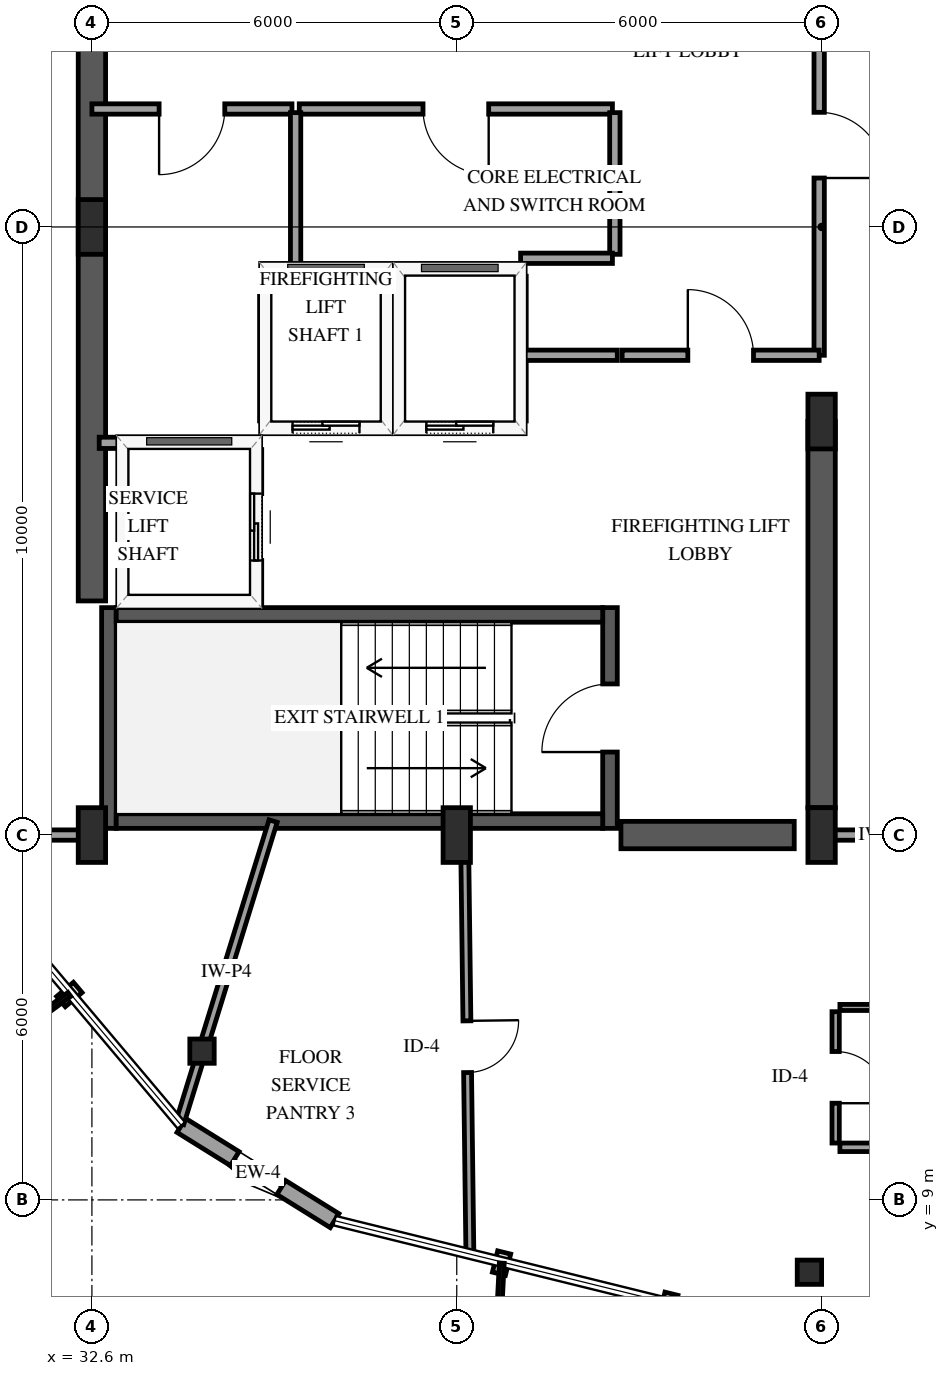
"""IFC4 building model, lengths in metres.
Left out: names, types, materials, properties, quantities, classifications, styles, units other than length and angle.
Written with IfcOpenShell. Run it as: python <this file> out.ifc"""

import sys

from ifc_helpers import new_model, si_unit, direction, frame, frame_2d, origin, origin_2d, place, context, subcontext, project, spatial, rectangle, i_section, extrude, element, fill, save


model = new_model("IFC4")
c1 = context("Model", 3, precision=1e-05, world=origin(), true_north=direction((0.0, 1.0)))
c2 = subcontext(c1, "Body", "Model", "MODEL_VIEW")
j1 = project(units=[si_unit("LENGTHUNIT", "METRE"), si_unit("PLANEANGLEUNIT", "RADIAN")], contexts=[c1])
p1 = place(None, origin())
s1 = spatial("IfcSite", under=j1, at=p1, CompositionType="ELEMENT")
p2 = place(p1, origin())
s2 = spatial("IfcBuilding", under=s1, at=p2, CompositionType="ELEMENT")
p3 = place(p2, frame((0.0, 0.0, 246.25)))
s3 = spatial("IfcBuildingStorey", under=s2, at=p3, CompositionType="ELEMENT", Elevation=246.25)
p4 = place(p3, frame((32.88, 15.11, 0.0), z_axis=(0.0, 0.0, 1.0), x_axis=(0.0, 1.0, 0.0)))
e1 = element("IfcWall", 1, at=p4, inside=s3, PredefinedType="SHEAR", context=c2, shape_type="SweptSolid", body=[
    extrude(rectangle(XDim=3.63, YDim=0.24, at=frame_2d((1.815, 0.0))), origin(), (0.0, 0.0, 1.0), 3.75),
])
p5 = place(p3, frame((41.12, 15.11, 0.0), z_axis=(0.0, 0.0, 1.0), x_axis=(0.0, 1.0, 0.0)))
e2 = element("IfcWall", 2, at=p5, inside=s3, PredefinedType="SHEAR", context=c2, shape_type="SweptSolid", body=[
    extrude(rectangle(XDim=3.63, YDim=0.24, at=frame_2d((1.815, 0.0))), origin(), (0.0, 0.0, 1.0), 3.75),
])
p6 = place(p5, frame((1.255, 0.0, 0.0)))
e3 = element("IfcOpeningElement", 3, at=p6, cuts=e2, PredefinedType="OPENING", context=c2, shape_type="SweptSolid", body=[
    extrude(rectangle(XDim=1.12, YDim=2.15, at=frame_2d((0.56, 1.075))), frame((0.0, 0.13, 0.0), z_axis=(0.0, -1.0, 0.0), x_axis=(1.0, 0.0, 0.0)), (0.0, 0.0, 1.0), 0.26),
])
for number, where, z_axis, x_axis in (
    (4, (33.0, 15.23, 0.0), (0.0, 0.0, 1.0), (1.0, 0.0, 0.0)),
    (5, (33.0, 18.62, 0.0), (0.0, 0.0, 1.0), (1.0, 0.0, 0.0)),
):
    element("IfcWall", number, at=place(p3, frame(where, z_axis=z_axis, x_axis=x_axis)), inside=s3, PredefinedType="SHEAR", context=c2, shape_type="SweptSolid", body=[
        extrude(rectangle(XDim=8.0, YDim=0.24, at=frame_2d((4.0, 0.0))), origin(), (0.0, 0.0, 1.0), 3.75),
    ])
p7 = place(p3, frame((32.6, 18.85, 0.0), z_axis=(0.0, 0.0, 1.0), x_axis=(0.0, 1.0, 0.0)))
e6 = element("IfcWall", 6, at=p7, inside=s3, PredefinedType="SHEAR", context=c2, shape_type="SweptSolid", body=[
    extrude(rectangle(XDim=12.3, YDim=0.45, at=frame_2d((6.15, 0.0))), origin(), (0.0, 0.0, 1.0), 3.75),
])
p8 = place(p3, frame((41.3, 15.0, 0.0), z_axis=(0.0, 0.0, 1.0), x_axis=(1.0, 0.0, 0.0)))
e7 = element("IfcWall", 7, at=p8, inside=s3, PredefinedType="SHEAR", context=c2, shape_type="SweptSolid", body=[
    extrude(rectangle(XDim=2.85, YDim=0.45, at=frame_2d((1.425, 0.0))), origin(), (0.0, 0.0, 1.0), 3.75),
])
p9 = place(p3, frame((44.6, 15.45, 0.0), z_axis=(0.0, 0.0, 1.0), x_axis=(0.0, 1.0, 0.0)))
e8 = element("IfcWall", 8, at=p9, inside=s3, PredefinedType="SHEAR", context=c2, shape_type="SweptSolid", body=[
    extrude(rectangle(XDim=6.35, YDim=0.45, at=frame_2d((3.175, 0.0))), origin(), (0.0, 0.0, 1.0), 3.75),
])
for number, where, z_axis, x_axis in (
    (9, (32.6, 15.0, 0.0), (0.0, 0.0, 1.0), (1.0, 0.0, 0.0)),
    (10, (32.6, 25.0, 0.0), (0.0, 0.0, 1.0), (1.0, 0.0, 0.0)),
    (11, (38.6, 15.0, 0.0), (0.0, 0.0, 1.0), (1.0, 0.0, 0.0)),
    (12, (44.6, 15.0, 0.0), (0.0, 0.0, 1.0), (1.0, 0.0, 0.0)),
    (13, (44.6, 21.8, 0.0), (0.0, 0.0, 1.0), (1.0, 0.0, 0.0)),
):
    element("IfcColumn", number, at=place(p3, frame(where, z_axis=z_axis, x_axis=x_axis)), inside=s3, PredefinedType="PILASTER", context=c2, shape_type="SweptSolid", body=[
        extrude(rectangle(XDim=0.45, YDim=0.9, at=origin_2d()), origin(), (0.0, 0.0, 1.0), 3.75),
    ])
for number, where, z_axis, x_axis in (
    (14, (34.411, 11.446, 0.0), (0.0, 0.0, 1.0), (1.0, 0.0, 0.0)),
    (15, (44.4, 7.811, 0.0), (0.0, 0.0, 1.0), (1.0, 0.0, 0.0)),
):
    element("IfcColumn", number, at=place(p3, frame(where, z_axis=z_axis, x_axis=x_axis)), inside=s3, PredefinedType="COLUMN", context=c2, shape_type="SweptSolid", body=[
        extrude(i_section(OverallWidth=0.401, OverallDepth=0.399, WebThickness=0.025, FlangeThickness=0.04, FilletRadius=0.038, at=origin_2d()), origin(), (0.0, 0.0, 1.0), 3.75),
    ])
p10 = place(p3, frame((34.071, 10.225, 0.0), z_axis=(0.0, 0.0, 1.0), x_axis=(0.849350139028, -0.527829841268, 0.0)))
e16 = element("IfcWall", 16, at=p10, inside=s3, PredefinedType="SOLIDWALL", context=c2, shape_type="SweptSolid", body=[
    extrude(rectangle(XDim=2.967, YDim=0.27, at=frame_2d((1.483, 0.0))), origin(), (0.0, 0.0, 1.0), 2.829),
])
p11 = place(p10, frame((1.033, 0.0, 0.75)))
e17 = element("IfcOpeningElement", 17, at=p11, cuts=e16, PredefinedType="OPENING", context=c2, shape_type="SweptSolid", body=[
    extrude(rectangle(XDim=0.9, YDim=1.5, at=frame_2d((0.45, 0.75))), frame((0.0, 0.145, 0.0), z_axis=(0.0, -1.0, 0.0), x_axis=(1.0, 0.0, 0.0)), (0.0, 0.0, 1.0), 0.29),
])
p12 = place(p3, frame((35.45, 21.7, 0.0), z_axis=(0.0, 0.0, 1.0), x_axis=(1.0, 0.0, 0.0)))
e18 = element("IfcWall", 18, at=p12, inside=s3, PredefinedType="SOLIDWALL", context=c2, shape_type="SweptSolid", body=[
    extrude(rectangle(XDim=2.0, YDim=0.185, at=frame_2d((1.0, 0.0))), origin(), (0.0, 0.0, 1.0), 2.824),
])
p13 = place(p12, frame((0.45, 0.0, 0.0)))
e19 = element("IfcOpeningElement", 19, at=p13, cuts=e18, PredefinedType="OPENING", context=c2, shape_type="SweptSolid", body=[
    extrude(rectangle(XDim=1.1, YDim=2.15, at=frame_2d((0.55, 1.075))), frame((0.0, 0.103, 0.0), z_axis=(0.0, -1.0, 0.0), x_axis=(1.0, 0.0, 0.0)), (0.0, 0.0, 1.0), 0.205),
])
p14 = place(p3, frame((35.45, 24.3, 0.0), z_axis=(0.0, 0.0, 1.0), x_axis=(1.0, 0.0, 0.0)))
e20 = element("IfcWall", 20, at=p14, inside=s3, PredefinedType="SOLIDWALL", context=c2, shape_type="SweptSolid", body=[
    extrude(rectangle(XDim=2.0, YDim=0.185, at=frame_2d((1.0, 0.0))), origin(), (0.0, 0.0, 1.0), 3.45),
])
for number, where, z_axis, x_axis in (
    (21, (35.45, 21.81, 0.0), (0.0, 0.0, 1.0), (0.0, 1.0, 0.0)),
    (22, (37.45, 21.81, 0.0), (0.0, 0.0, 1.0), (0.0, 1.0, 0.0)),
):
    element("IfcWall", number, at=place(p3, frame(where, z_axis=z_axis, x_axis=x_axis)), inside=s3, PredefinedType="SOLIDWALL", context=c2, shape_type="SweptSolid", body=[
        extrude(rectangle(XDim=2.38, YDim=0.185, at=frame_2d((1.19, 0.0))), origin(), (0.0, 0.0, 1.0), 3.45),
    ])
p15 = place(p3, frame((37.65, 21.7, 0.0), z_axis=(0.0, 0.0, 1.0), x_axis=(1.0, 0.0, 0.0)))
e23 = element("IfcWall", 23, at=p15, inside=s3, PredefinedType="SOLIDWALL", context=c2, shape_type="SweptSolid", body=[
    extrude(rectangle(XDim=2.0, YDim=0.185, at=frame_2d((1.0, 0.0))), origin(), (0.0, 0.0, 1.0), 2.824),
])
p16 = place(p15, frame((0.45, 0.0, 0.0)))
e24 = element("IfcOpeningElement", 24, at=p16, cuts=e23, PredefinedType="OPENING", context=c2, shape_type="SweptSolid", body=[
    extrude(rectangle(XDim=1.1, YDim=2.15, at=frame_2d((0.55, 1.075))), frame((0.0, 0.103, 0.0), z_axis=(0.0, -1.0, 0.0), x_axis=(1.0, 0.0, 0.0)), (0.0, 0.0, 1.0), 0.205),
])
p17 = place(p3, frame((37.65, 24.3, 0.0), z_axis=(0.0, 0.0, 1.0), x_axis=(1.0, 0.0, 0.0)))
e25 = element("IfcWall", 25, at=p17, inside=s3, PredefinedType="SOLIDWALL", context=c2, shape_type="SweptSolid", body=[
    extrude(rectangle(XDim=2.0, YDim=0.185, at=frame_2d((1.0, 0.0))), origin(), (0.0, 0.0, 1.0), 3.45),
])
p18 = place(p3, frame((39.65, 21.81, 0.0), z_axis=(0.0, 0.0, 1.0), x_axis=(0.0, 1.0, 0.0)))
e26 = element("IfcWall", 26, at=p18, inside=s3, PredefinedType="SOLIDWALL", context=c2, shape_type="SweptSolid", body=[
    extrude(rectangle(XDim=2.38, YDim=0.185, at=frame_2d((1.19, 0.0))), origin(), (0.0, 0.0, 1.0), 3.45),
])
p19 = place(p3, frame((32.72, 21.45, 0.0), z_axis=(0.0, 0.0, 1.0), x_axis=(1.0, 0.0, 0.0)))
e27 = element("IfcWall", 27, at=p19, inside=s3, PredefinedType="SOLIDWALL", context=c2, shape_type="SweptSolid", body=[
    extrude(rectangle(XDim=2.58, YDim=0.185, at=frame_2d((1.29, 0.0))), origin(), (0.0, 0.0, 1.0), 3.45),
])
p20 = place(p3, frame((35.3, 18.79, 0.0), z_axis=(0.0, 0.0, 1.0), x_axis=(0.0, 1.0, 0.0)))
e28 = element("IfcWall", 28, at=p20, inside=s3, PredefinedType="SOLIDWALL", context=c2, shape_type="SweptSolid", body=[
    extrude(rectangle(XDim=2.55, YDim=0.185, at=frame_2d((1.275, 0.0))), origin(), (0.0, 0.0, 1.0), 3.45),
])
p21 = place(p20, frame((0.725, 0.0, 0.0)))
e29 = element("IfcOpeningElement", 29, at=p21, cuts=e28, PredefinedType="OPENING", context=c2, shape_type="SweptSolid", body=[
    extrude(rectangle(XDim=1.1, YDim=2.15, at=frame_2d((0.55, 1.075))), frame((0.0, 0.103, 0.0), z_axis=(0.0, -1.0, 0.0), x_axis=(1.0, 0.0, 0.0)), (0.0, 0.0, 1.0), 0.205),
])
p22 = place(p3, frame((44.56, 29.8, 0.0), z_axis=(0.0, 0.0, 1.0), x_axis=(0.0, -1.0, 0.0)))
e30 = element("IfcWall", 30, at=p22, inside=s3, PredefinedType="PARTITIONING", context=c2, shape_type="SweptSolid", body=[
    extrude(rectangle(XDim=6.91, YDim=0.17, at=frame_2d((3.455, 0.0))), origin(), (0.0, 0.0, 1.0), 2.49),
])
p23 = place(p22, frame((2.915, 0.0, 0.0)))
e31 = element("IfcOpeningElement", 31, at=p23, cuts=e30, PredefinedType="OPENING", context=c2, shape_type="SweptSolid", body=[
    extrude(rectangle(XDim=1.08, YDim=2.15, at=frame_2d((0.54, 1.075))), frame((0.0, 0.095, 0.0), z_axis=(0.0, -1.0, 0.0), x_axis=(1.0, 0.0, 0.0)), (0.0, 0.0, 1.0), 0.19),
])
p24 = place(p3, frame((38.729, 14.929, 0.0), z_axis=(0.0, 0.0, 1.0), x_axis=(0.01274511582, -0.999918777713, 0.0)))
e32 = element("IfcWall", 32, at=p24, inside=s3, PredefinedType="PARTITIONING", context=c2, shape_type="SweptSolid", body=[
    extrude(rectangle(XDim=6.819, YDim=0.13, at=frame_2d((3.41, 0.0))), origin(), (0.0, 0.0, 1.0), 3.45),
])
p25 = place(p24, frame((2.985, 0.0, 0.0)))
e33 = element("IfcOpeningElement", 33, at=p25, cuts=e32, PredefinedType="OPENING", context=c2, shape_type="SweptSolid", body=[
    extrude(rectangle(XDim=0.85, YDim=2.1, at=frame_2d((0.425, 1.05))), frame((0.0, 0.075, 0.0), z_axis=(0.0, -1.0, 0.0), x_axis=(1.0, 0.0, 0.0)), (0.0, 0.0, 1.0), 0.15),
])
p26 = place(p3, frame((35.58, 15.23, 0.0), z_axis=(0.0, 0.0, 1.0), x_axis=(-0.2953646639, -0.955384590267, 0.0)))
e34 = element("IfcWall", 34, at=p26, inside=s3, PredefinedType="PARTITIONING", context=c2, shape_type="SweptSolid", body=[
    extrude(rectangle(XDim=5.204, YDim=0.14, at=frame_2d((2.602, 0.0))), origin(), (0.0, 0.0, 1.0), 2.745),
])
p27 = place(p3, frame((41.16, 26.94, 0.0), z_axis=(0.0, 0.0, 1.0), x_axis=(-1.0, 0.0, 0.0)))
e35 = element("IfcWall", 35, at=p27, inside=s3, PredefinedType="PARTITIONING", context=c2, shape_type="SweptSolid", body=[
    extrude(rectangle(XDim=5.15, YDim=0.17, at=frame_2d((2.575, 0.0))), origin(), (0.0, 0.0, 1.0), 3.45),
])
p28 = place(p27, frame((2.035, 0.0, 0.0)))
e36 = element("IfcOpeningElement", 36, at=p28, cuts=e35, PredefinedType="OPENING", context=c2, shape_type="SweptSolid", body=[
    extrude(rectangle(XDim=1.08, YDim=2.15, at=frame_2d((0.54, 1.075))), frame((0.0, 0.095, 0.0), z_axis=(0.0, -1.0, 0.0), x_axis=(1.0, 0.0, 0.0)), (0.0, 0.0, 1.0), 0.19),
])
p29 = place(p3, frame((35.89, 26.94, 0.0), z_axis=(0.0, 0.0, 1.0), x_axis=(-1.0, 0.0, 0.0)))
e37 = element("IfcWall", 37, at=p29, inside=s3, PredefinedType="PARTITIONING", context=c2, shape_type="SweptSolid", body=[
    extrude(rectangle(XDim=3.29, YDim=0.17, at=frame_2d((1.645, 0.0))), origin(), (0.0, 0.0, 1.0), 3.45),
])
p30 = place(p29, frame((1.105, 0.0, 0.0)))
e38 = element("IfcOpeningElement", 38, at=p30, cuts=e37, PredefinedType="OPENING", context=c2, shape_type="SweptSolid", body=[
    extrude(rectangle(XDim=1.08, YDim=2.15, at=frame_2d((0.54, 1.075))), frame((0.0, 0.095, 0.0), z_axis=(0.0, -1.0, 0.0), x_axis=(1.0, 0.0, 0.0)), (0.0, 0.0, 1.0), 0.19),
])
p31 = place(p3, frame((41.32, 22.89, 0.0), z_axis=(0.0, 0.0, 1.0), x_axis=(1.0, 0.0, 0.0)))
e39 = element("IfcWall", 39, at=p31, inside=s3, PredefinedType="PARTITIONING", context=c2, shape_type="SweptSolid", body=[
    extrude(rectangle(XDim=3.24, YDim=0.17, at=frame_2d((1.62, 0.0))), origin(), (0.0, 0.0, 1.0), 3.45),
])
p32 = place(p31, frame((1.08, 0.0, 0.0)))
e40 = element("IfcOpeningElement", 40, at=p32, cuts=e39, PredefinedType="OPENING", context=c2, shape_type="SweptSolid", body=[
    extrude(rectangle(XDim=1.08, YDim=2.15, at=frame_2d((0.54, 1.075))), frame((0.0, 0.095, 0.0), z_axis=(0.0, -1.0, 0.0), x_axis=(1.0, 0.0, 0.0)), (0.0, 0.0, 1.0), 0.19),
])
p33 = place(p3, frame((35.95, 26.88, 0.0), z_axis=(0.0, 0.0, 1.0), x_axis=(0.0, -1.0, 0.0)))
e41 = element("IfcWall", 41, at=p33, inside=s3, PredefinedType="PARTITIONING", context=c2, shape_type="SweptSolid", body=[
    extrude(rectangle(XDim=2.58, YDim=0.17, at=frame_2d((1.29, 0.0))), origin(), (0.0, 0.0, 1.0), 3.45),
])
p34 = place(p3, frame((32.53, 15.0, 0.0), z_axis=(0.0, 0.0, 1.0), x_axis=(-1.0, 0.0, 0.0)))
e42 = element("IfcWall", 42, at=p34, inside=s3, PredefinedType="PARTITIONING", context=c2, shape_type="SweptSolid", body=[
    extrude(rectangle(XDim=2.486, YDim=0.17, at=frame_2d((1.243, 0.0))), origin(), (0.0, 0.0, 1.0), 3.45),
])
p35 = place(p34, frame((0.768, 0.0, 0.0)))
e43 = element("IfcOpeningElement", 43, at=p35, cuts=e42, PredefinedType="OPENING", context=c2, shape_type="SweptSolid", body=[
    extrude(rectangle(XDim=0.98, YDim=2.15, at=frame_2d((0.49, 1.075))), frame((0.0, 0.095, 0.0), z_axis=(0.0, -1.0, 0.0), x_axis=(1.0, 0.0, 0.0)), (0.0, 0.0, 1.0), 0.19),
])
p36 = place(p3, frame((41.2, 24.55, 0.0), z_axis=(0.0, 0.0, 1.0), x_axis=(0.0, 1.0, 0.0)))
e44 = element("IfcWall", 44, at=p36, inside=s3, PredefinedType="PARTITIONING", context=c2, shape_type="SweptSolid", body=[
    extrude(rectangle(XDim=2.33, YDim=0.17, at=frame_2d((1.165, 0.0))), origin(), (0.0, 0.0, 1.0), 3.45),
])
p37 = place(p3, frame((44.831, 12.095, 0.0), z_axis=(0.0, 0.0, 1.0), x_axis=(0.0, -1.0, 0.0)))
e45 = element("IfcWall", 45, at=p37, inside=s3, PredefinedType="PARTITIONING", context=c2, shape_type="SweptSolid", body=[
    extrude(rectangle(XDim=2.16, YDim=0.12, at=frame_2d((1.08, 0.0))), origin(), (0.0, 0.0, 1.0), 2.828),
])
p38 = place(p37, frame((0.655, 0.0, 0.0)))
e46 = element("IfcOpeningElement", 46, at=p38, cuts=e45, PredefinedType="OPENING", context=c2, shape_type="SweptSolid", body=[
    extrude(rectangle(XDim=0.85, YDim=2.1, at=frame_2d((0.425, 1.05))), frame((0.0, 0.07, 0.0), z_axis=(0.0, -1.0, 0.0), x_axis=(1.0, 0.0, 0.0)), (0.0, 0.0, 1.0), 0.14),
])
p39 = place(p3, frame((47.061, 12.165, 0.0), z_axis=(0.0, 0.0, 1.0), x_axis=(-1.0, 0.0, 0.0)))
e47 = element("IfcWall", 47, at=p39, inside=s3, PredefinedType="PARTITIONING", context=c2, shape_type="SweptSolid", body=[
    extrude(rectangle(XDim=2.16, YDim=0.1, at=frame_2d((1.08, 0.0))), origin(), (0.0, 0.0, 1.0), 3.45),
])
p40 = place(p3, frame((44.901, 9.865, 0.0), z_axis=(0.0, 0.0, 1.0), x_axis=(1.0, 0.0, 0.0)))
e48 = element("IfcWall", 48, at=p40, inside=s3, PredefinedType="PARTITIONING", context=c2, shape_type="SweptSolid", body=[
    extrude(rectangle(XDim=2.16, YDim=0.14, at=frame_2d((1.08, 0.0))), origin(), (0.0, 0.0, 1.0), 3.45),
])
p41 = place(p3, frame((39.72, 22.89, 0.0), z_axis=(0.0, 0.0, 1.0), x_axis=(1.0, 0.0, 0.0)))
e49 = element("IfcWall", 49, at=p41, inside=s3, PredefinedType="PARTITIONING", context=c2, shape_type="SweptSolid", body=[
    extrude(rectangle(XDim=1.52, YDim=0.17, at=frame_2d((0.76, 0.0))), origin(), (0.0, 0.0, 1.0), 3.45),
])
p42 = place(p3, frame((39.65, 24.485, 0.0), z_axis=(0.0, 0.0, 1.0), x_axis=(1.0, 0.0, 0.0)))
e50 = element("IfcWall", 50, at=p42, inside=s3, PredefinedType="PARTITIONING", context=c2, shape_type="SweptSolid", body=[
    extrude(rectangle(XDim=1.51, YDim=0.17, at=frame_2d((0.755, 0.0))), origin(), (0.0, 0.0, 1.0), 3.45),
])
p43 = place(p3, frame((45.439, 15.0, 0.0), z_axis=(0.0, 0.0, 1.0), x_axis=(-1.0, 0.0, 0.0)))
e51 = element("IfcWall", 51, at=p43, inside=s3, PredefinedType="PARTITIONING", context=c2, shape_type="SweptSolid", body=[
    extrude(rectangle(XDim=0.769, YDim=0.17, at=frame_2d((0.385, 0.0))), origin(), (0.0, 0.0, 1.0), 3.45),
])
p44 = place(p11, origin())
e52 = element("IfcWindow", 52, at=p44, inside=s3, PartitioningType="SINGLE_PANEL", PredefinedType="WINDOW", context=c2, shape_type="SweptSolid", body=[
    extrude(rectangle(XDim=0.9, YDim=1.5, at=frame_2d((0.45, 0.75))), frame((0.0, 0.03, 0.0), z_axis=(0.0, -1.0, 0.0), x_axis=(1.0, 0.0, 0.0)), (0.0, 0.0, 1.0), 0.06),
])
fill(e17, e52)
p45 = place(p13, origin())
e53 = element("IfcDoor", 53, at=p45, inside=s3, OperationType="SLIDING_TO_LEFT", PredefinedType="DOOR", context=c2, shape_type="SweptSolid", body=[
    extrude(rectangle(XDim=1.1, YDim=2.15, at=frame_2d((0.55, 1.075))), frame((0.0, 0.025, 0.0), z_axis=(0.0, -1.0, 0.0), x_axis=(1.0, 0.0, 0.0)), (0.0, 0.0, 1.0), 0.05),
])
fill(e19, e53)
p46 = place(p16, origin())
e54 = element("IfcDoor", 54, at=p46, inside=s3, OperationType="SLIDING_TO_LEFT", PredefinedType="DOOR", context=c2, shape_type="SweptSolid", body=[
    extrude(rectangle(XDim=1.1, YDim=2.15, at=frame_2d((0.55, 1.075))), frame((0.0, 0.025, 0.0), z_axis=(0.0, -1.0, 0.0), x_axis=(1.0, 0.0, 0.0)), (0.0, 0.0, 1.0), 0.05),
])
fill(e24, e54)
p47 = place(p21, origin())
e55 = element("IfcDoor", 55, at=p47, inside=s3, OperationType="SLIDING_TO_LEFT", PredefinedType="DOOR", context=c2, shape_type="SweptSolid", body=[
    extrude(rectangle(XDim=1.1, YDim=2.15, at=frame_2d((0.55, 1.075))), frame((0.0, 0.025, 0.0), z_axis=(0.0, -1.0, 0.0), x_axis=(1.0, 0.0, 0.0)), (0.0, 0.0, 1.0), 0.05),
])
fill(e29, e55)
p48 = place(p6, origin())
e56 = element("IfcDoor", 56, at=p48, inside=s3, OperationType="SINGLE_SWING_LEFT", PredefinedType="DOOR", context=c2, shape_type="SweptSolid", body=[
    extrude(rectangle(XDim=1.12, YDim=2.15, at=frame_2d((0.56, 1.075))), frame((0.0, 0.025, 0.0), z_axis=(0.0, -1.0, 0.0), x_axis=(1.0, 0.0, 0.0)), (0.0, 0.0, 1.0), 0.05),
])
fill(e3, e56)
p49 = place(p23, origin())
e57 = element("IfcDoor", 57, at=p49, inside=s3, OperationType="SINGLE_SWING_RIGHT", PredefinedType="DOOR", context=c2, shape_type="SweptSolid", body=[
    extrude(rectangle(XDim=1.08, YDim=2.15, at=frame_2d((0.54, 1.075))), frame((0.0, 0.025, 0.0), z_axis=(0.0, -1.0, 0.0), x_axis=(1.0, 0.0, 0.0)), (0.0, 0.0, 1.0), 0.05),
])
fill(e31, e57)
p50 = place(p25, origin())
e58 = element("IfcDoor", 58, at=p50, inside=s3, OperationType="SINGLE_SWING_LEFT", PredefinedType="DOOR", context=c2, shape_type="SweptSolid", body=[
    extrude(rectangle(XDim=0.85, YDim=2.1, at=frame_2d((0.425, 1.05))), frame((0.0, 0.025, 0.0), z_axis=(0.0, -1.0, 0.0), x_axis=(1.0, 0.0, 0.0)), (0.0, 0.0, 1.0), 0.05),
])
fill(e33, e58)
p51 = place(p28, origin())
e59 = element("IfcDoor", 59, at=p51, inside=s3, OperationType="SINGLE_SWING_LEFT", PredefinedType="DOOR", context=c2, shape_type="SweptSolid", body=[
    extrude(rectangle(XDim=1.08, YDim=2.15, at=frame_2d((0.54, 1.075))), frame((0.0, 0.025, 0.0), z_axis=(0.0, -1.0, 0.0), x_axis=(1.0, 0.0, 0.0)), (0.0, 0.0, 1.0), 0.05),
])
fill(e36, e59)
p52 = place(p30, origin())
e60 = element("IfcDoor", 60, at=p52, inside=s3, OperationType="SINGLE_SWING_RIGHT", PredefinedType="DOOR", context=c2, shape_type="SweptSolid", body=[
    extrude(rectangle(XDim=1.08, YDim=2.15, at=frame_2d((0.54, 1.075))), frame((0.0, 0.025, 0.0), z_axis=(0.0, -1.0, 0.0), x_axis=(1.0, 0.0, 0.0)), (0.0, 0.0, 1.0), 0.05),
])
fill(e38, e60)
p53 = place(p32, origin())
e61 = element("IfcDoor", 61, at=p53, inside=s3, OperationType="SINGLE_SWING_LEFT", PredefinedType="DOOR", context=c2, shape_type="SweptSolid", body=[
    extrude(rectangle(XDim=1.08, YDim=2.15, at=frame_2d((0.54, 1.075))), frame((0.0, 0.025, 0.0), z_axis=(0.0, -1.0, 0.0), x_axis=(1.0, 0.0, 0.0)), (0.0, 0.0, 1.0), 0.05),
])
fill(e40, e61)
p54 = place(p38, origin())
e62 = element("IfcDoor", 62, at=p54, inside=s3, OperationType="SINGLE_SWING_RIGHT", PredefinedType="DOOR", context=c2, shape_type="SweptSolid", body=[
    extrude(rectangle(XDim=0.85, YDim=2.1, at=frame_2d((0.425, 1.05))), frame((0.0, 0.025, 0.0), z_axis=(0.0, -1.0, 0.0), x_axis=(1.0, 0.0, 0.0)), (0.0, 0.0, 1.0), 0.05),
])
fill(e46, e62)
save(model, sys.argv[1])
